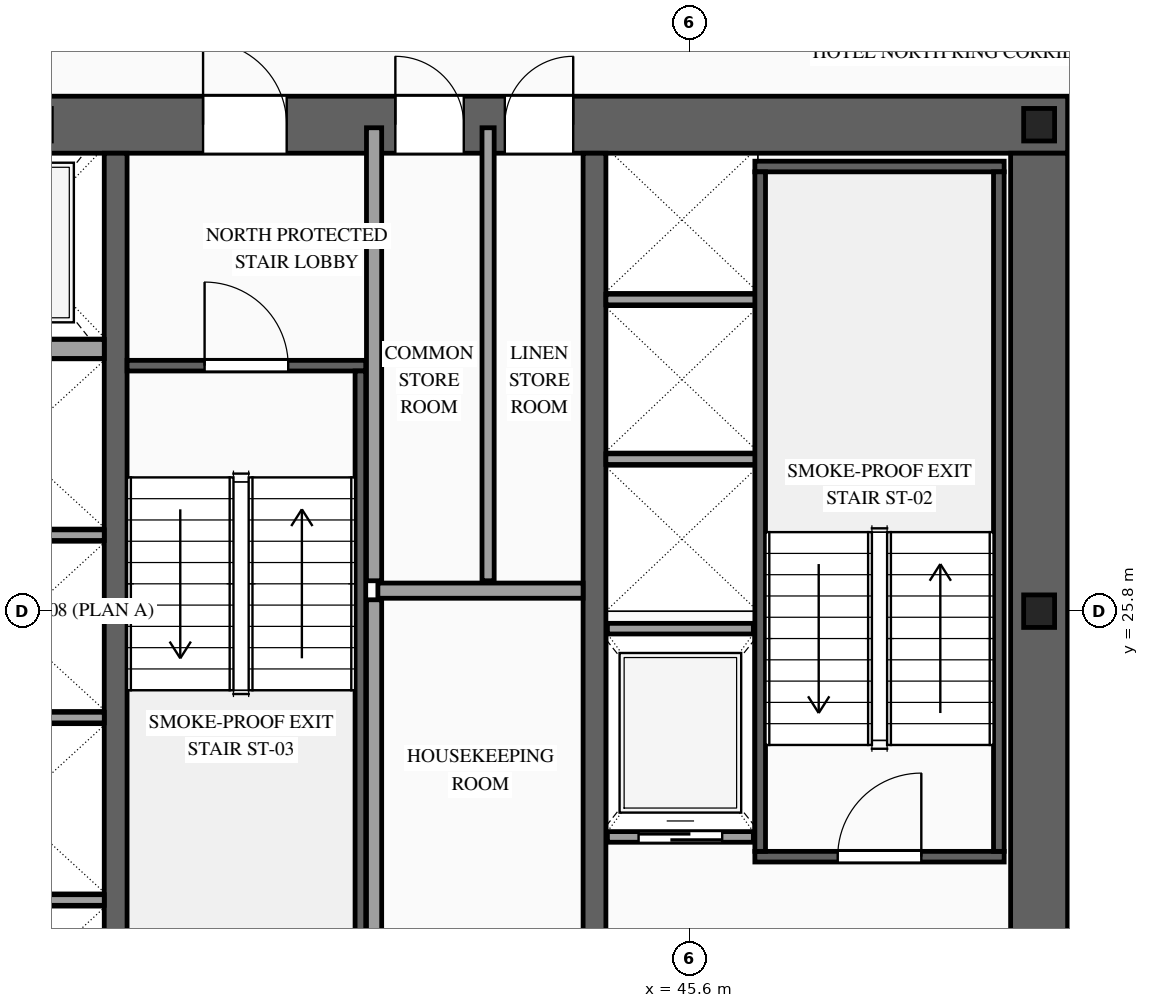
"""IFC4 building model, lengths in metres.
Left out: names, types, materials, properties, quantities, classifications, styles, units other than length and angle.
Written with IfcOpenShell. Run it as: python <this file> out.ifc"""

import sys

from ifc_helpers import new_model, si_unit, direction, frame, frame_2d, origin, origin_2d, place, context, subcontext, project, spatial, rectangle, i_section, extrude, source, transform, mapped, element, fill, save


model = new_model("IFC4")
c1 = context("Model", 3, precision=1e-05, world=origin(), true_north=direction((0.0, 1.0)))
c2 = subcontext(c1, "Body", "Model", "MODEL_VIEW")
j1 = project(units=[si_unit("LENGTHUNIT", "METRE"), si_unit("PLANEANGLEUNIT", "RADIAN")], contexts=[c1])
p1 = place(None, origin())
s1 = spatial("IfcSite", under=j1, at=p1, CompositionType="ELEMENT")
p2 = place(p1, origin())
s2 = spatial("IfcBuilding", under=s1, at=p2, CompositionType="ELEMENT")
p3 = place(p2, frame((0.0, 0.0, 115.4)))
s3 = spatial("IfcBuildingStorey", under=s2, at=p3, CompositionType="ELEMENT", Elevation=115.4)
p4 = place(p3, frame((23.425, 32.2, 0.0), z_axis=(0.0, 0.0, 1.0), x_axis=(1.0, 0.0, 0.0)))
e1 = element("IfcWall", 1, at=p4, inside=s3, PredefinedType="SHEAR", context=c2, shape_type="SweptSolid", body=[
    extrude(rectangle(XDim=27.15, YDim=0.75, at=frame_2d((13.575, 0.0))), origin(), (0.0, 0.0, 1.0), 3.6),
])
p5 = place(p4, frame((4.645, 0.0, 0.0)))
e2 = element("IfcOpeningElement", 2, at=p5, cuts=e1, PredefinedType="OPENING", context=c2, shape_type="SweptSolid", body=[
    extrude(rectangle(XDim=0.9, YDim=2.15, at=frame_2d((0.45, 1.075))), frame((0.0, 0.39, 0.0), z_axis=(0.0, -1.0, 0.0), x_axis=(1.0, 0.0, 0.0)), (0.0, 0.0, 1.0), 0.78),
])
p6 = place(p4, frame((9.925, 0.0, 0.0)))
e3 = element("IfcOpeningElement", 3, at=p6, cuts=e1, PredefinedType="OPENING", context=c2, shape_type="SweptSolid", body=[
    extrude(rectangle(XDim=1.1, YDim=2.2, at=frame_2d((0.55, 1.1))), frame((0.0, 0.39, 0.0), z_axis=(0.0, -1.0, 0.0), x_axis=(1.0, 0.0, 0.0)), (0.0, 0.0, 1.0), 0.78),
])
p7 = place(p4, frame((15.775, 0.0, 0.0)))
e4 = element("IfcOpeningElement", 4, at=p7, cuts=e1, PredefinedType="OPENING", context=c2, shape_type="SweptSolid", body=[
    extrude(rectangle(XDim=1.1, YDim=2.2, at=frame_2d((0.55, 1.1))), frame((0.0, 0.39, 0.0), z_axis=(0.0, -1.0, 0.0), x_axis=(1.0, 0.0, 0.0)), (0.0, 0.0, 1.0), 0.78),
])
p8 = place(p4, frame((18.305, 0.0, 0.0)))
e5 = element("IfcOpeningElement", 5, at=p8, cuts=e1, PredefinedType="OPENING", context=c2, shape_type="SweptSolid", body=[
    extrude(rectangle(XDim=0.9, YDim=2.15, at=frame_2d((0.45, 1.075))), frame((0.0, 0.39, 0.0), z_axis=(0.0, -1.0, 0.0), x_axis=(1.0, 0.0, 0.0)), (0.0, 0.0, 1.0), 0.78),
])
p9 = place(p4, frame((19.745, 0.0, 0.0)))
e6 = element("IfcOpeningElement", 6, at=p9, cuts=e1, PredefinedType="OPENING", context=c2, shape_type="SweptSolid", body=[
    extrude(rectangle(XDim=0.9, YDim=2.15, at=frame_2d((0.45, 1.075))), frame((0.0, 0.39, 0.0), z_axis=(0.0, -1.0, 0.0), x_axis=(1.0, 0.0, 0.0)), (0.0, 0.0, 1.0), 0.78),
])
m1 = source(origin(), c2, "Body", "SweptSolid", [
    extrude(rectangle(XDim=12.05, YDim=0.75, at=frame_2d((6.025, 0.0))), origin(), (0.0, 0.0, 1.0), 3.6),
])
p10 = place(p3, frame((50.2, 19.775, 0.0), z_axis=(0.0, 0.0, 1.0), x_axis=(0.0, 1.0, 0.0)))
e7 = element("IfcWall", 7, at=p10, inside=s3, PredefinedType="SHEAR", context=c2, shape_type="MappedRepresentation", body=[
    mapped(m1, transform((0.0, 0.0, 0.0), scale=1.0)),
])
m2 = source(origin(), c2, "Body", "SweptSolid", [
    extrude(rectangle(XDim=12.05, YDim=0.3, at=frame_2d((6.025, 0.0))), origin(), (0.0, 0.0, 1.0), 3.6),
])
for number, where, z_axis, x_axis in (
    (8, (38.05, 19.775, 0.0), (0.0, 0.0, 1.0), (0.0, 1.0, 0.0)),
    (9, (44.35, 19.775, 0.0), (0.0, 0.0, 1.0), (0.0, 1.0, 0.0)),
):
    element("IfcWall", number, at=place(p3, frame(where, z_axis=z_axis, x_axis=x_axis)), inside=s3, PredefinedType="SOLIDWALL", context=c2, shape_type="MappedRepresentation", body=[
        mapped(m2, transform((0.0, 0.0, 0.0), scale=1.0)),
    ])
m3 = source(origin(), c2, "Body", "SweptSolid", [
    extrude(i_section(OverallWidth=0.407, OverallDepth=0.428, WebThickness=0.02, FlangeThickness=0.035, at=origin_2d()), origin(), (0.0, 0.0, 1.0), 3.6),
])
for number, where, z_axis, x_axis in (
    (10, (50.2, 25.8, 0.0), (0.0, 0.0, 1.0), (1.0, 0.0, 0.0)),
    (11, (50.2, 32.2, 0.0), (0.0, 0.0, 1.0), (1.0, 0.0, 0.0)),
):
    element("IfcColumn", number, at=place(p3, frame(where, z_axis=z_axis, x_axis=x_axis)), inside=s3, PredefinedType="COLUMN", context=c2, shape_type="MappedRepresentation", body=[
        mapped(m3, transform((0.0, 0.0, 0.0), scale=1.0)),
    ])
p11 = place(p3, frame((44.52, 22.83, 0.0), z_axis=(0.0, 0.0, 1.0), x_axis=(1.0, 0.0, 0.0)))
e12 = element("IfcWall", 12, at=p11, inside=s3, PredefinedType="SOLIDWALL", context=c2, shape_type="SweptSolid", body=[
    extrude(rectangle(XDim=1.92, YDim=0.14, at=frame_2d((0.96, 0.0))), origin(), (0.0, 0.0, 1.0), 3.38),
])
p12 = place(p11, frame((0.41, 0.0, 0.0)))
e13 = element("IfcOpeningElement", 13, at=p12, cuts=e12, PredefinedType="OPENING", context=c2, shape_type="SweptSolid", body=[
    extrude(rectangle(XDim=1.1, YDim=2.2, at=frame_2d((0.55, 1.1))), frame((0.0, 0.085, 0.0), z_axis=(0.0, -1.0, 0.0), x_axis=(1.0, 0.0, 0.0)), (0.0, 0.0, 1.0), 0.17),
])
m4 = source(origin(), c2, "Body", "SweptSolid", [
    extrude(rectangle(XDim=1.92, YDim=0.14, at=frame_2d((0.96, 0.0))), origin(), (0.0, 0.0, 1.0), 3.38),
])
p13 = place(p3, frame((44.52, 25.57, 0.0), z_axis=(0.0, 0.0, 1.0), x_axis=(1.0, 0.0, 0.0)))
e14 = element("IfcWall", 14, at=p13, inside=s3, PredefinedType="SOLIDWALL", context=c2, shape_type="MappedRepresentation", body=[
    mapped(m4, transform((0.0, 0.0, 0.0), scale=1.0)),
])
m5 = source(origin(), c2, "Body", "SweptSolid", [
    extrude(rectangle(XDim=2.4, YDim=0.14, at=frame_2d((1.2, 0.0))), origin(), (0.0, 0.0, 1.0), 3.38),
])
for number, where, z_axis, x_axis in (
    (15, (35.5, 22.0, 0.0), (0.0, 0.0, 1.0), (1.0, 0.0, 0.0)),
    (16, (35.5, 24.4, 0.0), (0.0, 0.0, 1.0), (1.0, 0.0, 0.0)),
    (17, (35.5, 26.8, 0.0), (0.0, 0.0, 1.0), (1.0, 0.0, 0.0)),
):
    element("IfcWall", number, at=place(p3, frame(where, z_axis=z_axis, x_axis=x_axis)), inside=s3, PredefinedType="SOLIDWALL", context=c2, shape_type="MappedRepresentation", body=[
        mapped(m5, transform((0.0, 0.0, 0.0), scale=1.0)),
    ])
m6 = source(origin(), c2, "Body", "SweptSolid", [
    extrude(rectangle(XDim=2.4, YDim=0.25, at=frame_2d((1.2, 0.0))), origin(), (0.0, 0.0, 1.0), 3.38),
])
p14 = place(p3, frame((35.5, 29.25, 0.0), z_axis=(0.0, 0.0, 1.0), x_axis=(1.0, 0.0, 0.0)))
e18 = element("IfcWall", 18, at=p14, inside=s3, PredefinedType="SOLIDWALL", context=c2, shape_type="MappedRepresentation", body=[
    mapped(m6, transform((0.0, 0.0, 0.0), scale=1.0)),
])
m7 = source(origin(), c2, "Body", "SweptSolid", [
    extrude(rectangle(XDim=2.0, YDim=0.14, at=frame_2d((1.0, 0.0))), origin(), (0.0, 0.0, 1.0), 3.38),
])
for number, where, z_axis, x_axis in (
    (19, (44.5, 27.8, 0.0), (0.0, 0.0, 1.0), (1.0, 0.0, 0.0)),
    (20, (44.5, 29.9, 0.0), (0.0, 0.0, 1.0), (1.0, 0.0, 0.0)),
):
    element("IfcWall", number, at=place(p3, frame(where, z_axis=z_axis, x_axis=x_axis)), inside=s3, PredefinedType="SOLIDWALL", context=c2, shape_type="MappedRepresentation", body=[
        mapped(m7, transform((0.0, 0.0, 0.0), scale=1.0)),
    ])
p15 = place(p3, frame((46.46, 22.57, 0.0), z_axis=(0.0, 0.0, 1.0), x_axis=(1.0, 0.0, 0.0)))
e21 = element("IfcWall", 21, at=p15, inside=s3, PredefinedType="SOLIDWALL", context=c2, shape_type="SweptSolid", body=[
    extrude(rectangle(XDim=3.28, YDim=0.14, at=frame_2d((1.64, 0.0))), origin(), (0.0, 0.0, 1.0), 3.38),
])
p16 = place(p15, frame((1.09, 0.0, 0.0)))
e22 = element("IfcOpeningElement", 22, at=p16, cuts=e21, PredefinedType="OPENING", context=c2, shape_type="SweptSolid", body=[
    extrude(rectangle(XDim=1.1, YDim=2.2, at=frame_2d((0.55, 1.1))), frame((0.0, 0.085, 0.0), z_axis=(0.0, -1.0, 0.0), x_axis=(1.0, 0.0, 0.0)), (0.0, 0.0, 1.0), 0.17),
])
m8 = source(origin(), c2, "Body", "SweptSolid", [
    extrude(rectangle(XDim=3.28, YDim=0.14, at=frame_2d((1.64, 0.0))), origin(), (0.0, 0.0, 1.0), 3.38),
])
p17 = place(p3, frame((46.46, 31.65, 0.0), z_axis=(0.0, 0.0, 1.0), x_axis=(1.0, 0.0, 0.0)))
e23 = element("IfcWall", 23, at=p17, inside=s3, PredefinedType="SOLIDWALL", context=c2, shape_type="MappedRepresentation", body=[
    mapped(m8, transform((0.0, 0.0, 0.0), scale=1.0)),
])
m9 = source(origin(), c2, "Body", "SweptSolid", [
    extrude(rectangle(XDim=8.94, YDim=0.14, at=frame_2d((4.47, 0.0))), origin(), (0.0, 0.0, 1.0), 3.38),
])
for number, where, z_axis, x_axis in (
    (24, (46.53, 22.64, 0.0), (0.0, 0.0, 1.0), (0.0, 1.0, 0.0)),
    (25, (49.67, 22.64, 0.0), (0.0, 0.0, 1.0), (0.0, 1.0, 0.0)),
):
    element("IfcWall", number, at=place(p3, frame(where, z_axis=z_axis, x_axis=x_axis)), inside=s3, PredefinedType="SOLIDWALL", context=c2, shape_type="MappedRepresentation", body=[
        mapped(m9, transform((0.0, 0.0, 0.0), scale=1.0)),
    ])
p18 = place(p3, frame((38.2, 29.03, 0.0), z_axis=(0.0, 0.0, 1.0), x_axis=(1.0, 0.0, 0.0)))
e26 = element("IfcWall", 26, at=p18, inside=s3, PredefinedType="SOLIDWALL", context=c2, shape_type="SweptSolid", body=[
    extrude(rectangle(XDim=3.14, YDim=0.14, at=frame_2d((1.57, 0.0))), origin(), (0.0, 0.0, 1.0), 3.38),
])
p19 = place(p18, frame((1.02, 0.0, 0.0)))
e27 = element("IfcOpeningElement", 27, at=p19, cuts=e26, PredefinedType="OPENING", context=c2, shape_type="SweptSolid", body=[
    extrude(rectangle(XDim=1.1, YDim=2.2, at=frame_2d((0.55, 1.1))), frame((0.0, 0.085, 0.0), z_axis=(0.0, -1.0, 0.0), x_axis=(1.0, 0.0, 0.0)), (0.0, 0.0, 1.0), 0.17),
])
m10 = source(origin(), c2, "Body", "SweptSolid", [
    extrude(rectangle(XDim=8.94, YDim=0.14, at=frame_2d((4.47, 0.0))), origin(), (0.0, 0.0, 1.0), 3.38),
])
p20 = place(p3, frame((41.27, 20.02, 0.0), z_axis=(0.0, 0.0, 1.0), x_axis=(0.0, 1.0, 0.0)))
e28 = element("IfcWall", 28, at=p20, inside=s3, PredefinedType="SOLIDWALL", context=c2, shape_type="MappedRepresentation", body=[
    mapped(m10, transform((0.0, 0.0, 0.0), scale=1.0)),
])
m11 = source(origin(), c2, "Body", "SweptSolid", [
    extrude(rectangle(XDim=6.51, YDim=0.2, at=frame_2d((3.255, 0.0))), origin(), (0.0, 0.0, 1.0), 3.38),
])
p21 = place(p3, frame((41.45, 19.44, 0.0), z_axis=(0.0, 0.0, 1.0), x_axis=(0.0, 1.0, 0.0)))
e29 = element("IfcWall", 29, at=p21, inside=s3, PredefinedType="PARTITIONING", context=c2, shape_type="MappedRepresentation", body=[
    mapped(m11, transform((0.0, 0.0, 0.0), scale=1.0)),
])
m12 = source(origin(), c2, "Body", "SweptSolid", [
    extrude(rectangle(XDim=2.7, YDim=0.2, at=frame_2d((1.35, 0.0))), origin(), (0.0, 0.0, 1.0), 3.38),
])
p22 = place(p3, frame((41.5, 26.07, 0.0), z_axis=(0.0, 0.0, 1.0), x_axis=(1.0, 0.0, 0.0)))
e30 = element("IfcWall", 30, at=p22, inside=s3, PredefinedType="PARTITIONING", context=c2, shape_type="MappedRepresentation", body=[
    mapped(m12, transform((0.0, 0.0, 0.0), scale=1.0)),
])
m13 = source(origin(), c2, "Body", "SweptSolid", [
    extrude(rectangle(XDim=5.96, YDim=0.2, at=frame_2d((2.98, 0.0))), origin(), (0.0, 0.0, 1.0), 3.38),
])
p23 = place(p3, frame((41.45, 26.2, 0.0), z_axis=(0.0, 0.0, 1.0), x_axis=(0.0, 1.0, 0.0)))
e31 = element("IfcWall", 31, at=p23, inside=s3, PredefinedType="PARTITIONING", context=c2, shape_type="MappedRepresentation", body=[
    mapped(m13, transform((0.0, 0.0, 0.0), scale=1.0)),
])
m14 = source(origin(), c2, "Body", "SweptSolid", [
    extrude(rectangle(XDim=5.96, YDim=0.16, at=frame_2d((2.98, 0.0))), origin(), (0.0, 0.0, 1.0), 3.38),
])
p24 = place(p3, frame((42.95, 26.2, 0.0), z_axis=(0.0, 0.0, 1.0), x_axis=(0.0, 1.0, 0.0)))
e32 = element("IfcWall", 32, at=p24, inside=s3, PredefinedType="PARTITIONING", context=c2, shape_type="MappedRepresentation", body=[
    mapped(m14, transform((0.0, 0.0, 0.0), scale=1.0)),
])
m15 = source(origin(), c2, "Body", "SweptSolid", [
    extrude(rectangle(XDim=1.1, YDim=2.2, at=frame_2d((0.55, 1.1))), frame((0.0, 0.025, 0.0), z_axis=(0.0, -1.0, 0.0), x_axis=(1.0, 0.0, 0.0)), (0.0, 0.0, 1.0), 0.05),
])
p25 = place(p12, origin())
e33 = element("IfcDoor", 33, at=p25, inside=s3, OperationType="SLIDING_TO_RIGHT", PredefinedType="DOOR", context=c2, shape_type="MappedRepresentation", body=[
    mapped(m15, transform((0.0, 0.0, 0.0), scale=1.0)),
])
fill(e13, e33)
m16 = source(origin(), c2, "Body", "SweptSolid", [
    extrude(rectangle(XDim=1.1, YDim=2.2, at=frame_2d((0.55, 1.1))), frame((0.0, 0.025, 0.0), z_axis=(0.0, -1.0, 0.0), x_axis=(1.0, 0.0, 0.0)), (0.0, 0.0, 1.0), 0.05),
])
p26 = place(p16, origin())
e34 = element("IfcDoor", 34, at=p26, inside=s3, OperationType="SINGLE_SWING_RIGHT", PredefinedType="DOOR", context=c2, shape_type="MappedRepresentation", body=[
    mapped(m16, transform((0.0, 0.0, 0.0), scale=1.0)),
])
fill(e22, e34)
p27 = place(p19, origin())
e35 = element("IfcDoor", 35, at=p27, inside=s3, OperationType="SINGLE_SWING_LEFT", PredefinedType="DOOR", context=c2, shape_type="MappedRepresentation", body=[
    mapped(m16, transform((0.0, 0.0, 0.0), scale=1.0)),
])
fill(e27, e35)
p28 = place(p7, origin())
e36 = element("IfcDoor", 36, at=p28, inside=s3, OperationType="SINGLE_SWING_LEFT", PredefinedType="DOOR", context=c2, shape_type="MappedRepresentation", body=[
    mapped(m16, transform((0.0, 0.0, 0.0), scale=1.0)),
])
fill(e4, e36)
m17 = source(origin(), c2, "Body", "SweptSolid", [
    extrude(rectangle(XDim=0.9, YDim=2.15, at=frame_2d((0.45, 1.075))), frame((0.0, 0.025, 0.0), z_axis=(0.0, -1.0, 0.0), x_axis=(1.0, 0.0, 0.0)), (0.0, 0.0, 1.0), 0.05),
])
p29 = place(p8, origin())
e37 = element("IfcDoor", 37, at=p29, inside=s3, OperationType="SINGLE_SWING_LEFT", PredefinedType="DOOR", context=c2, shape_type="MappedRepresentation", body=[
    mapped(m17, transform((0.0, 0.0, 0.0), scale=1.0)),
])
fill(e5, e37)
p30 = place(p9, origin())
e38 = element("IfcDoor", 38, at=p30, inside=s3, OperationType="SINGLE_SWING_RIGHT", PredefinedType="DOOR", context=c2, shape_type="MappedRepresentation", body=[
    mapped(m17, transform((0.0, 0.0, 0.0), scale=1.0)),
])
fill(e6, e38)
save(model, sys.argv[1])
